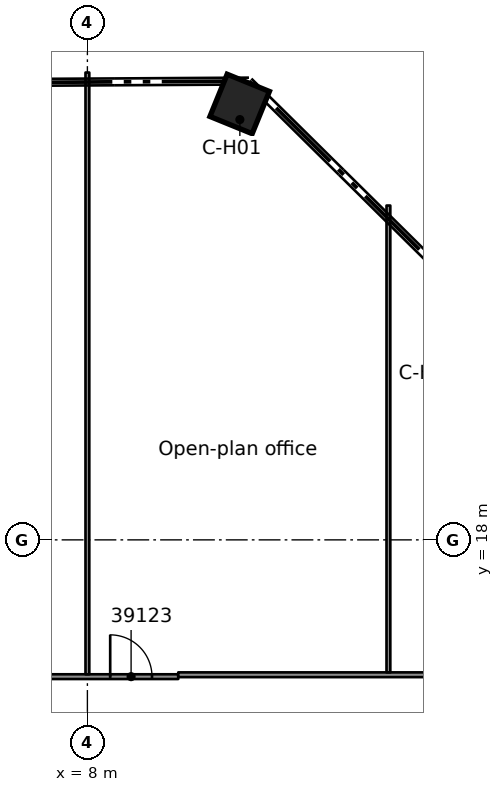
"""IFC4 building model, lengths in metres.
Left out: names, types, materials, properties, quantities, classifications, styles, units other than length and angle.
Written with IfcOpenShell. Run it as: python <this file> out.ifc"""

import sys

from ifc_helpers import new_model, si_unit, direction, frame, frame_2d, origin, origin_2d, place, context, subcontext, project, spatial, rectangle, extrude, element, fill, save


model = new_model("IFC4")
c1 = context("Model", 3, precision=1e-05, world=origin(), true_north=direction((0.0, 1.0)))
c2 = subcontext(c1, "Body", "Model", "MODEL_VIEW")
j1 = project(units=[si_unit("LENGTHUNIT", "METRE"), si_unit("PLANEANGLEUNIT", "RADIAN")], contexts=[c1])
p1 = place(None, origin())
s1 = spatial("IfcSite", under=j1, at=p1, CompositionType="ELEMENT")
p2 = place(p1, origin())
s2 = spatial("IfcBuilding", under=s1, at=p2, CompositionType="ELEMENT")
p3 = place(p2, frame((0.0, 0.0, 192.1)))
s3 = spatial("IfcBuildingStorey", under=s2, at=p3, CompositionType="ELEMENT", Elevation=192.1)
p4 = place(p3, frame((12.007, 29.47, 0.0), z_axis=(0.0, 0.0, 1.0), x_axis=(0.377323624231, 0.926081466501, 0.0)))
e1 = element("IfcColumn", 1, at=p4, inside=s3, PredefinedType="COLUMN", context=c2, shape_type="SweptSolid", body=[
    extrude(rectangle(XDim=1.2, YDim=1.2, at=origin_2d()), origin(), (0.0, 0.0, 1.0), 3.5),
])
p5 = place(p3, frame((-10.39, 14.401, 0.0), z_axis=(0.0, 0.0, 1.0), x_axis=(1.0, 0.0, 0.0)))
e2 = element("IfcWall", 2, at=p5, inside=s3, PredefinedType="PARTITIONING", context=c2, shape_type="SweptSolid", body=[
    extrude(rectangle(XDim=20.781, YDim=0.125, at=frame_2d((10.391, 0.0))), origin(), (0.0, 0.0, 1.0), 3.06),
])
p6 = place(p5, frame((18.99, 0.0, 0.0)))
e3 = element("IfcOpeningElement", 3, at=p6, cuts=e2, PredefinedType="OPENING", context=c2, shape_type="SweptSolid", body=[
    extrude(rectangle(XDim=1.1, YDim=2.1, at=frame_2d((0.55, 1.05))), frame((0.0, 0.073, 0.0), z_axis=(0.0, -1.0, 0.0), x_axis=(1.0, 0.0, 0.0)), (0.0, 0.0, 1.0), 0.145),
])
p7 = place(p5, frame((13.49, 0.0, 0.0)))
e4 = element("IfcOpeningElement", 4, at=p7, cuts=e2, PredefinedType="OPENING", context=c2, shape_type="SweptSolid", body=[
    extrude(rectangle(XDim=1.8, YDim=2.1, at=frame_2d((0.9, 1.05))), frame((0.0, 0.073, 0.0), z_axis=(0.0, -1.0, 0.0), x_axis=(1.0, 0.0, 0.0)), (0.0, 0.0, 1.0), 0.145),
])
p8 = place(p5, frame((5.49, 0.0, 0.0)))
e5 = element("IfcOpeningElement", 5, at=p8, cuts=e2, PredefinedType="OPENING", context=c2, shape_type="SweptSolid", body=[
    extrude(rectangle(XDim=1.8, YDim=2.1, at=frame_2d((0.9, 1.05))), frame((0.0, 0.073, 0.0), z_axis=(0.0, -1.0, 0.0), x_axis=(1.0, 0.0, 0.0)), (0.0, 0.0, 1.0), 0.145),
])
p9 = place(p3, frame((10.391, 14.451, 0.0), z_axis=(0.0, 0.0, 1.0), x_axis=(1.0, 0.0, 0.0)))
e6 = element("IfcWall", 6, at=p9, inside=s3, PredefinedType="PARTITIONING", context=c2, shape_type="SweptSolid", body=[
    extrude(rectangle(XDim=10.996, YDim=0.125, at=frame_2d((5.498, 0.0))), origin(), (0.0, 0.0, 1.0), 3.06),
])
p10 = place(p9, frame((7.38, 0.0, 0.0)))
e7 = element("IfcOpeningElement", 7, at=p10, cuts=e6, PredefinedType="OPENING", context=c2, shape_type="SweptSolid", body=[
    extrude(rectangle(XDim=1.8, YDim=2.1, at=frame_2d((0.9, 1.05))), frame((0.0, 0.073, 0.0), z_axis=(0.0, -1.0, 0.0), x_axis=(1.0, 0.0, 0.0)), (0.0, 0.0, 1.0), 0.145),
])
p11 = place(p3, frame((15.921, 14.514, 0.0), z_axis=(0.0, 0.0, 1.0), x_axis=(0.0, 1.0, 0.0)))
e8 = element("IfcWall", 8, at=p11, inside=s3, PredefinedType="PARTITIONING", context=c2, shape_type="SweptSolid", body=[
    extrude(rectangle(XDim=12.283, YDim=0.1, at=frame_2d((6.142, 0.0))), origin(), (0.0, 0.0, 1.0), 3.06),
])
p12 = place(p3, frame((8.0, 14.463, 0.0), z_axis=(0.0, 0.0, 1.0), x_axis=(0.0, 1.0, 0.0)))
e9 = element("IfcWall", 9, at=p12, inside=s3, PredefinedType="PARTITIONING", context=c2, shape_type="SweptSolid", body=[
    extrude(rectangle(XDim=15.834, YDim=0.1, at=frame_2d((7.917, 0.0))), origin(), (0.0, 0.0, 1.0), 3.06),
])
p13 = place(p6, origin())
e10 = element("IfcDoor", 10, at=p13, inside=s3, OperationType="SINGLE_SWING_RIGHT", PredefinedType="DOOR", context=c2, shape_type="SweptSolid", body=[
    extrude(rectangle(XDim=1.1, YDim=2.1, at=frame_2d((0.55, 1.05))), frame((0.0, 0.025, 0.0), z_axis=(0.0, -1.0, 0.0), x_axis=(1.0, 0.0, 0.0)), (0.0, 0.0, 1.0), 0.05),
])
fill(e3, e10)
save(model, sys.argv[1])
